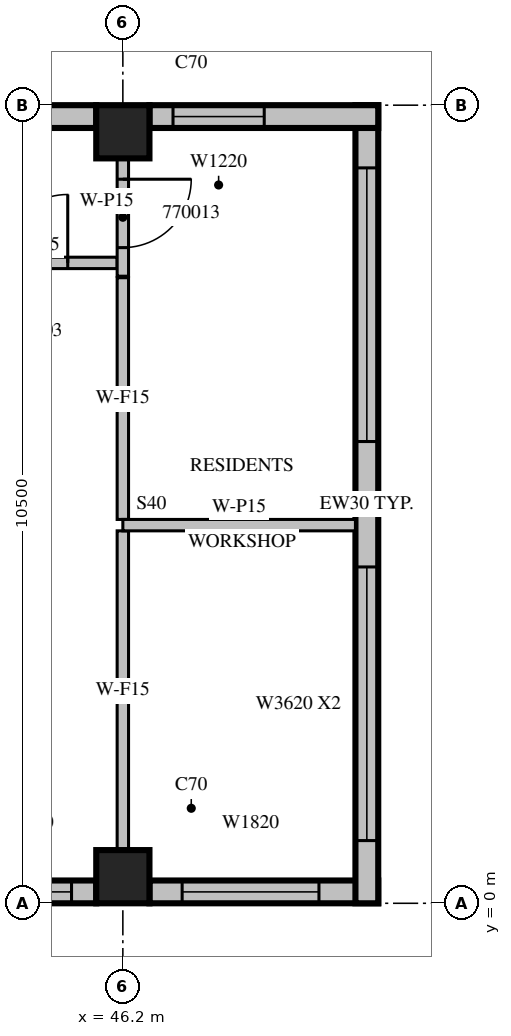
"""IFC4 building model, lengths in metres.
Left out: names, types, materials, properties, quantities, classifications, styles, units other than length and angle.
Written with IfcOpenShell. Run it as: python <this file> out.ifc"""

import sys

from ifc_helpers import new_model, si_unit, direction, frame, frame_2d, origin, origin_2d, place, context, subcontext, project, spatial, rectangle, extrude, source, transform, mapped, element, fill, save


model = new_model("IFC4")
c1 = context("Model", 3, precision=1e-05, world=origin(), true_north=direction((0.0, 1.0)))
c2 = subcontext(c1, "Body", "Model", "MODEL_VIEW")
j1 = project(units=[si_unit("LENGTHUNIT", "METRE"), si_unit("PLANEANGLEUNIT", "RADIAN")], contexts=[c1])
p1 = place(None, origin())
s1 = spatial("IfcSite", under=j1, at=p1, CompositionType="ELEMENT")
p2 = place(p1, origin())
s2 = spatial("IfcBuilding", under=s1, at=p2, CompositionType="ELEMENT")
p3 = place(p2, frame((0.0, 0.0, 305.5)))
s3 = spatial("IfcBuildingStorey", under=s2, at=p3, CompositionType="ELEMENT", Elevation=305.5)
m1 = source(origin(), c2, "Body", "SweptSolid", [
    extrude(rectangle(XDim=0.7, YDim=0.7, at=origin_2d()), origin(), (0.0, 0.0, 1.0), 3.5),
])
for number, where, z_axis, x_axis in (
    (1, (46.2, 0.35, 0.0), (0.0, 0.0, 1.0), (1.0, 0.0, 0.0)),
    (2, (46.2, 10.15, 0.0), (0.0, 0.0, 1.0), (1.0, 0.0, 0.0)),
):
    element("IfcColumn", number, at=place(p3, frame(where, z_axis=z_axis, x_axis=x_axis)), inside=s3, PredefinedType="COLUMN", context=c2, shape_type="MappedRepresentation", body=[
        mapped(m1, transform((0.0, 0.0, 0.0), scale=1.0)),
    ])
m2 = source(origin(), c2, "Body", "SweptSolid", [
    extrude(rectangle(XDim=1.85, YDim=0.3, at=frame_2d((0.925, 0.0))), origin(), (0.0, 0.0, 1.0), 3.1),
])
p4 = place(p3, frame((44.0, 0.15, 0.0), z_axis=(0.0, 0.0, 1.0), x_axis=(1.0, 0.0, 0.0)))
e3 = element("IfcWall", 3, at=p4, inside=s3, PredefinedType="STANDARD", context=c2, shape_type="MappedRepresentation", body=[
    mapped(m2, transform((0.0, 0.0, 0.0), scale=1.0)),
])
m3 = source(origin(), c2, "Body", "SweptSolid", [
    extrude(rectangle(XDim=1.2, YDim=2.0, at=frame_2d((0.6, 1.0))), frame((0.0, 0.16, 0.0), z_axis=(0.0, -1.0, 0.0), x_axis=(1.0, 0.0, 0.0)), (0.0, 0.0, 1.0), 0.32),
])
p5 = place(p4, frame((0.325, 0.0, 0.6)))
e4 = element("IfcOpeningElement", 4, at=p5, cuts=e3, PredefinedType="OPENING", context=c2, shape_type="MappedRepresentation", body=[
    mapped(m3, transform((0.0, 0.0, 0.0), scale=1.0)),
])
m4 = source(origin(), c2, "Body", "SweptSolid", [
    extrude(rectangle(XDim=3.01, YDim=0.3, at=frame_2d((1.505, 0.0))), origin(), (0.0, 0.0, 1.0), 3.1),
])
p6 = place(p3, frame((46.55, 0.15, 0.0), z_axis=(0.0, 0.0, 1.0), x_axis=(1.0, 0.0, 0.0)))
e5 = element("IfcWall", 5, at=p6, inside=s3, PredefinedType="STANDARD", context=c2, shape_type="MappedRepresentation", body=[
    mapped(m4, transform((0.0, 0.0, 0.0), scale=1.0)),
])
m5 = source(origin(), c2, "Body", "SweptSolid", [
    extrude(rectangle(XDim=1.8, YDim=2.0, at=frame_2d((0.9, 1.0))), frame((0.0, 0.16, 0.0), z_axis=(0.0, -1.0, 0.0), x_axis=(1.0, 0.0, 0.0)), (0.0, 0.0, 1.0), 0.32),
])
p7 = place(p6, frame((0.43, 0.0, 0.6)))
e6 = element("IfcOpeningElement", 6, at=p7, cuts=e5, PredefinedType="OPENING", context=c2, shape_type="MappedRepresentation", body=[
    mapped(m5, transform((0.0, 0.0, 0.0), scale=1.0)),
])
m6 = source(origin(), c2, "Body", "SweptSolid", [
    extrude(rectangle(XDim=10.5, YDim=0.3, at=frame_2d((5.25, 0.0))), origin(), (0.0, 0.0, 1.0), 3.1),
])
p8 = place(p3, frame((49.41, 0.0, 0.0), z_axis=(0.0, 0.0, 1.0), x_axis=(0.0, 1.0, 0.0)))
e7 = element("IfcWall", 7, at=p8, inside=s3, PredefinedType="STANDARD", context=c2, shape_type="MappedRepresentation", body=[
    mapped(m6, transform((0.0, 0.0, 0.0), scale=1.0)),
])
m7 = source(origin(), c2, "Body", "SweptSolid", [
    extrude(rectangle(XDim=3.6, YDim=2.0, at=frame_2d((1.8, 1.0))), frame((0.0, 0.16, 0.0), z_axis=(0.0, -1.0, 0.0), x_axis=(1.0, 0.0, 0.0)), (0.0, 0.0, 1.0), 0.32),
])
p9 = place(p8, frame((0.825, 0.0, 0.6)))
e8 = element("IfcOpeningElement", 8, at=p9, cuts=e7, PredefinedType="OPENING", context=c2, shape_type="MappedRepresentation", body=[
    mapped(m7, transform((0.0, 0.0, 0.0), scale=1.0)),
])
p10 = place(p8, frame((6.075, 0.0, 0.6)))
e9 = element("IfcOpeningElement", 9, at=p10, cuts=e7, PredefinedType="OPENING", context=c2, shape_type="MappedRepresentation", body=[
    mapped(m7, transform((0.0, 0.0, 0.0), scale=1.0)),
])
p11 = place(p3, frame((49.56, 10.35, 0.0), z_axis=(0.0, 0.0, 1.0), x_axis=(-1.0, 0.0, 0.0)))
e10 = element("IfcWall", 10, at=p11, inside=s3, PredefinedType="STANDARD", context=c2, shape_type="MappedRepresentation", body=[
    mapped(m4, transform((0.0, 0.0, 0.0), scale=1.0)),
])
p12 = place(p11, frame((1.5, 0.0, 0.6)))
e11 = element("IfcOpeningElement", 11, at=p12, cuts=e10, PredefinedType="OPENING", context=c2, shape_type="MappedRepresentation", body=[
    mapped(m3, transform((0.0, 0.0, 0.0), scale=1.0)),
])
m8 = source(origin(), c2, "Body", "SweptSolid", [
    extrude(rectangle(XDim=7.35, YDim=0.3, at=frame_2d((3.675, 0.0))), origin(), (0.0, 0.0, 1.0), 3.1),
])
p13 = place(p3, frame((45.85, 10.35, 0.0), z_axis=(0.0, 0.0, 1.0), x_axis=(-1.0, 0.0, 0.0)))
e12 = element("IfcWall", 12, at=p13, inside=s3, PredefinedType="STANDARD", context=c2, shape_type="MappedRepresentation", body=[
    mapped(m8, transform((0.0, 0.0, 0.0), scale=1.0)),
])
m9 = source(origin(), c2, "Body", "SweptSolid", [
    extrude(rectangle(XDim=3.0, YDim=2.0, at=frame_2d((1.5, 1.0))), frame((0.0, 0.16, 0.0), z_axis=(0.0, -1.0, 0.0), x_axis=(1.0, 0.0, 0.0)), (0.0, 0.0, 1.0), 0.32),
])
p14 = place(p13, frame((1.09, 0.0, 0.6)))
e13 = element("IfcOpeningElement", 13, at=p14, cuts=e12, PredefinedType="OPENING", context=c2, shape_type="MappedRepresentation", body=[
    mapped(m9, transform((0.0, 0.0, 0.0), scale=1.0)),
])
p15 = place(p13, frame((5.77, 0.0, 0.6)))
e14 = element("IfcOpeningElement", 14, at=p15, cuts=e12, PredefinedType="OPENING", context=c2, shape_type="MappedRepresentation", body=[
    mapped(m3, transform((0.0, 0.0, 0.0), scale=1.0)),
])
m10 = source(origin(), c2, "Body", "SweptSolid", [
    extrude(rectangle(XDim=2.2, YDim=0.15, at=frame_2d((1.1, 0.0))), origin(), (0.0, 0.0, 1.0), 3.1),
])
p16 = place(p3, frame((46.125, 8.425, 0.0), z_axis=(0.0, 0.0, 1.0), x_axis=(-1.0, 0.0, 0.0)))
e15 = element("IfcWall", 15, at=p16, inside=s3, PredefinedType="PARTITIONING", context=c2, shape_type="MappedRepresentation", body=[
    mapped(m10, transform((0.0, 0.0, 0.0), scale=1.0)),
])
m11 = source(origin(), c2, "Body", "SweptSolid", [
    extrude(rectangle(XDim=0.9, YDim=2.1, at=frame_2d((0.45, 1.05))), frame((0.0, 0.085, 0.0), z_axis=(0.0, -1.0, 0.0), x_axis=(1.0, 0.0, 0.0)), (0.0, 0.0, 1.0), 0.17),
])
p17 = place(p16, frame((0.65, 0.0, 0.0)))
e16 = element("IfcOpeningElement", 16, at=p17, cuts=e15, PredefinedType="OPENING", context=c2, shape_type="MappedRepresentation", body=[
    mapped(m11, transform((0.0, 0.0, 0.0), scale=1.0)),
])
m12 = source(origin(), c2, "Body", "SweptSolid", [
    extrude(rectangle(XDim=1.551, YDim=0.15, at=frame_2d((0.775, 0.0))), origin(), (0.0, 0.0, 1.0), 3.1),
])
p18 = place(p3, frame((46.2, 9.801, 0.0), z_axis=(0.0, 0.0, 1.0), x_axis=(0.0, -1.0, 0.0)))
e17 = element("IfcWall", 17, at=p18, inside=s3, PredefinedType="PARTITIONING", context=c2, shape_type="MappedRepresentation", body=[
    mapped(m12, transform((0.0, 0.0, 0.0), scale=1.0)),
])
p19 = place(p18, frame((0.275, 0.0, 0.0)))
e18 = element("IfcOpeningElement", 18, at=p19, cuts=e17, PredefinedType="OPENING", context=c2, shape_type="MappedRepresentation", body=[
    mapped(m11, transform((0.0, 0.0, 0.0), scale=1.0)),
])
m13 = source(origin(), c2, "Body", "SweptSolid", [
    extrude(rectangle(XDim=4.201, YDim=0.15, at=frame_2d((2.1, 0.0))), origin(), (0.0, 0.0, 1.0), 3.1),
])
p20 = place(p3, frame((46.2, 0.699, 0.0), z_axis=(0.0, 0.0, 1.0), x_axis=(0.0, 1.0, 0.0)))
e19 = element("IfcWall", 19, at=p20, inside=s3, PredefinedType="PARTITIONING", context=c2, shape_type="MappedRepresentation", body=[
    mapped(m13, transform((0.0, 0.0, 0.0), scale=1.0)),
])
p21 = place(p3, frame((46.2, 5.05, 0.0), z_axis=(0.0, 0.0, 1.0), x_axis=(0.0, 1.0, 0.0)))
e20 = element("IfcWall", 20, at=p21, inside=s3, PredefinedType="PARTITIONING", context=c2, shape_type="SweptSolid", body=[
    extrude(rectangle(XDim=3.18, YDim=0.15, at=frame_2d((1.59, 0.0))), origin(), (0.0, 0.0, 1.0), 3.1),
])
m14 = source(origin(), c2, "Body", "SweptSolid", [
    extrude(rectangle(XDim=3.06, YDim=0.15, at=frame_2d((1.53, 0.0))), origin(), (0.0, 0.0, 1.0), 3.1),
])
p22 = place(p3, frame((49.26, 4.975, 0.0), z_axis=(0.0, 0.0, 1.0), x_axis=(-1.0, 0.0, 0.0)))
e21 = element("IfcWall", 21, at=p22, inside=s3, PredefinedType="PARTITIONING", context=c2, shape_type="MappedRepresentation", body=[
    mapped(m14, transform((0.0, 0.0, 0.0), scale=1.0)),
])
m15 = source(origin(), c2, "Body", "SweptSolid", [
    extrude(rectangle(XDim=1.2, YDim=2.0, at=frame_2d((0.6, 1.0))), frame((0.0, 0.03, 0.0), z_axis=(0.0, -1.0, 0.0), x_axis=(1.0, 0.0, 0.0)), (0.0, 0.0, 1.0), 0.06),
])
p23 = place(p5, origin())
e22 = element("IfcWindow", 22, at=p23, inside=s3, PartitioningType="SINGLE_PANEL", PredefinedType="WINDOW", context=c2, shape_type="MappedRepresentation", body=[
    mapped(m15, transform((0.0, 0.0, 0.0), scale=1.0)),
])
fill(e4, e22)
m16 = source(origin(), c2, "Body", "SweptSolid", [
    extrude(rectangle(XDim=1.8, YDim=2.0, at=frame_2d((0.9, 1.0))), frame((0.0, 0.03, 0.0), z_axis=(0.0, -1.0, 0.0), x_axis=(1.0, 0.0, 0.0)), (0.0, 0.0, 1.0), 0.06),
])
p24 = place(p7, origin())
e23 = element("IfcWindow", 23, at=p24, inside=s3, PartitioningType="SINGLE_PANEL", PredefinedType="WINDOW", context=c2, shape_type="MappedRepresentation", body=[
    mapped(m16, transform((0.0, 0.0, 0.0), scale=1.0)),
])
fill(e6, e23)
m17 = source(origin(), c2, "Body", "SweptSolid", [
    extrude(rectangle(XDim=3.6, YDim=2.0, at=frame_2d((1.8, 1.0))), frame((0.0, 0.03, 0.0), z_axis=(0.0, -1.0, 0.0), x_axis=(1.0, 0.0, 0.0)), (0.0, 0.0, 1.0), 0.06),
])
p25 = place(p9, origin())
e24 = element("IfcWindow", 24, at=p25, inside=s3, PartitioningType="SINGLE_PANEL", PredefinedType="WINDOW", context=c2, shape_type="MappedRepresentation", body=[
    mapped(m17, transform((0.0, 0.0, 0.0), scale=1.0)),
])
fill(e8, e24)
p26 = place(p10, origin())
e25 = element("IfcWindow", 25, at=p26, inside=s3, PartitioningType="SINGLE_PANEL", PredefinedType="WINDOW", context=c2, shape_type="MappedRepresentation", body=[
    mapped(m17, transform((0.0, 0.0, 0.0), scale=1.0)),
])
fill(e9, e25)
p27 = place(p12, origin())
e26 = element("IfcWindow", 26, at=p27, inside=s3, PartitioningType="SINGLE_PANEL", PredefinedType="WINDOW", context=c2, shape_type="MappedRepresentation", body=[
    mapped(m15, transform((0.0, 0.0, 0.0), scale=1.0)),
])
fill(e11, e26)
m18 = source(origin(), c2, "Body", "SweptSolid", [
    extrude(rectangle(XDim=0.9, YDim=2.1, at=frame_2d((0.45, 1.05))), frame((0.0, 0.025, 0.0), z_axis=(0.0, -1.0, 0.0), x_axis=(1.0, 0.0, 0.0)), (0.0, 0.0, 1.0), 0.05),
])
p28 = place(p17, origin())
e27 = element("IfcDoor", 27, at=p28, inside=s3, OperationType="SINGLE_SWING_RIGHT", PredefinedType="DOOR", context=c2, shape_type="MappedRepresentation", body=[
    mapped(m18, transform((0.0, 0.0, 0.0), scale=1.0)),
])
fill(e16, e27)
p29 = place(p19, origin())
e28 = element("IfcDoor", 28, at=p29, inside=s3, OperationType="SINGLE_SWING_LEFT", PredefinedType="DOOR", context=c2, shape_type="MappedRepresentation", body=[
    mapped(m18, transform((0.0, 0.0, 0.0), scale=1.0)),
])
fill(e18, e28)
save(model, sys.argv[1])
